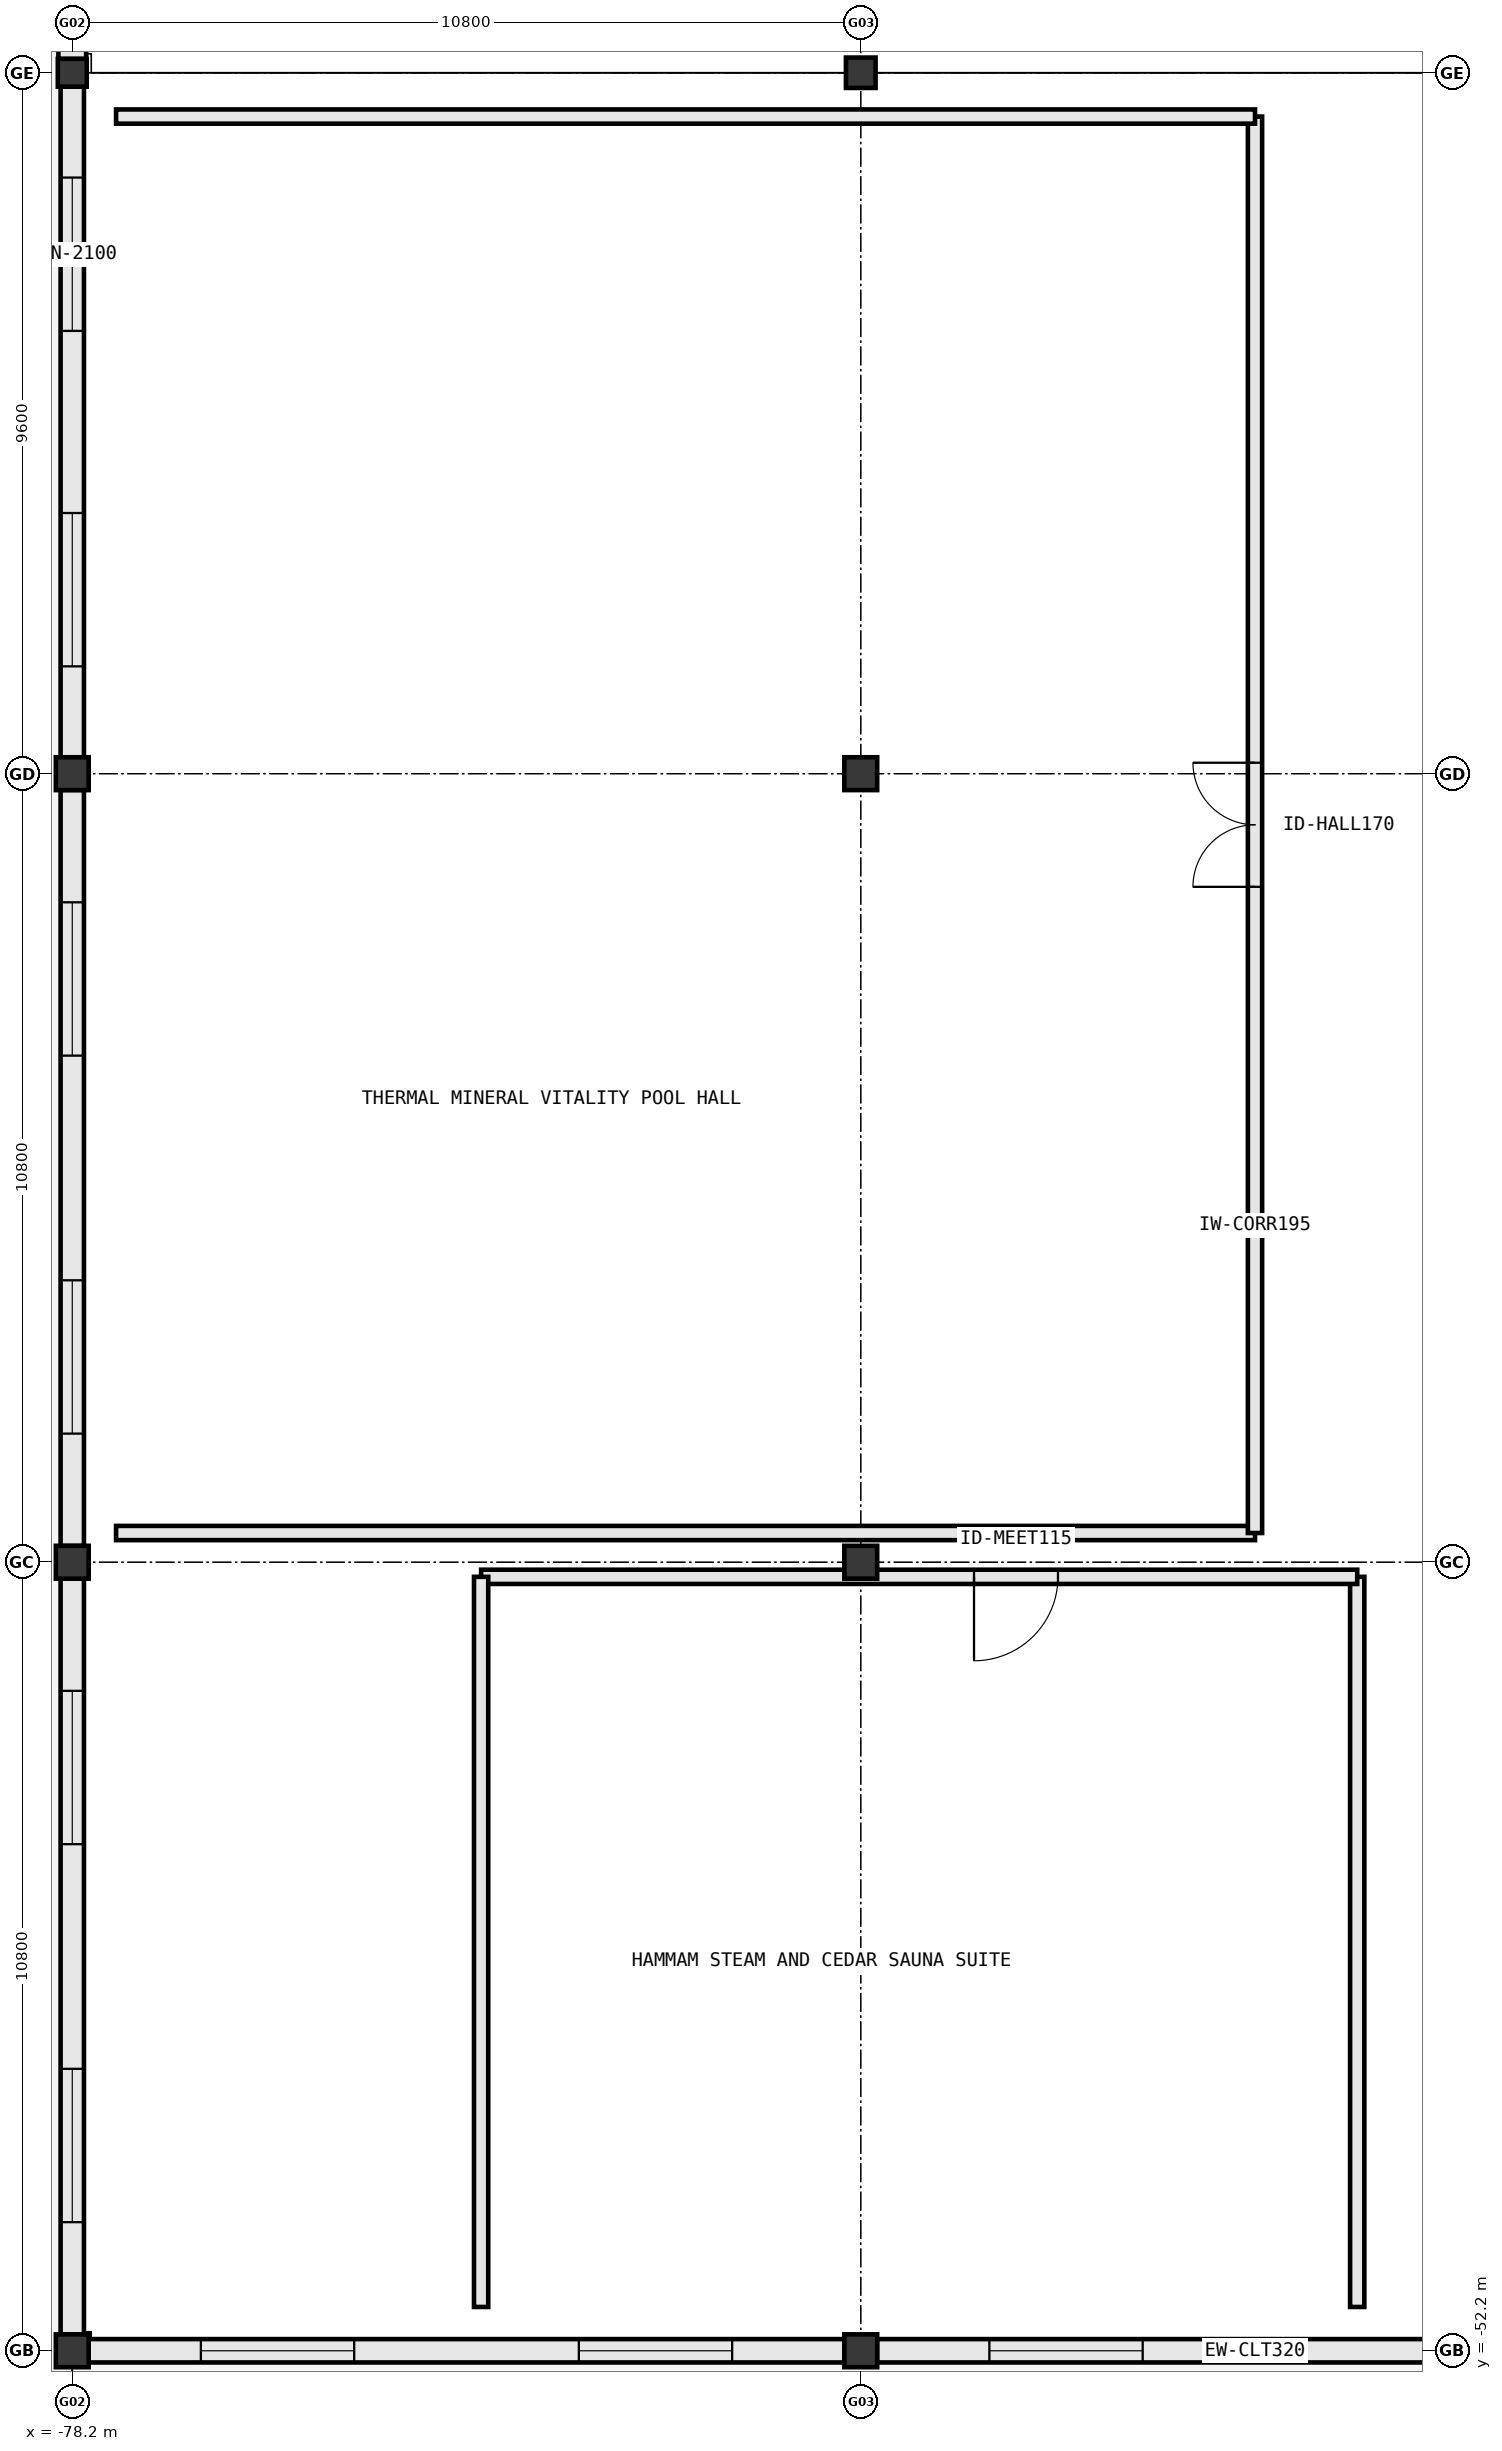
"""IFC4 building model, lengths in metres.
Left out: names, types, materials, properties, quantities, classifications, styles, units other than length and angle.
Written with IfcOpenShell. Run it as: python <this file> out.ifc"""

import sys

from ifc_helpers import new_model, si_unit, direction, frame, frame_2d, origin, origin_2d, place, context, subcontext, project, spatial, rectangle, i_section, extrude, element, fill, save


model = new_model("IFC4")
c1 = context("Model", 3, precision=1e-05, world=origin(), true_north=direction((0.0, 1.0)))
c2 = subcontext(c1, "Body", "Model", "MODEL_VIEW")
j1 = project(units=[si_unit("LENGTHUNIT", "METRE"), si_unit("PLANEANGLEUNIT", "RADIAN")], contexts=[c1])
p1 = place(None, origin())
s1 = spatial("IfcSite", under=j1, at=p1, CompositionType="ELEMENT")
p2 = place(p1, origin())
s2 = spatial("IfcBuilding", under=s1, at=p2, CompositionType="ELEMENT")
p3 = place(p2, origin())
s3 = spatial("IfcBuildingStorey", under=s2, at=p3, CompositionType="ELEMENT", Elevation=0.0)
p4 = place(p3, frame((-78.2, -21.0, 0.0), z_axis=(0.0, 0.0, 1.0), x_axis=(1.0, 0.0, 0.0)))
e1 = element("IfcColumn", 1, at=p4, inside=s3, PredefinedType="COLUMN", context=c2, shape_type="SweptSolid", body=[
    extrude(i_section(OverallWidth=0.396, OverallDepth=0.381, WebThickness=0.019, FlangeThickness=0.03, at=origin_2d()), origin(), (0.0, 0.0, 1.0), 5.4),
])
p5 = place(p3, frame((-67.4, -21.0, 0.0), z_axis=(0.0, 0.0, 1.0), x_axis=(1.0, 0.0, 0.0)))
e2 = element("IfcColumn", 2, at=p5, inside=s3, PredefinedType="COLUMN", context=c2, shape_type="SweptSolid", body=[
    extrude(i_section(OverallWidth=0.406, OverallDepth=0.416, WebThickness=0.03, FlangeThickness=0.048, at=origin_2d()), origin(), (0.0, 0.0, 1.0), 5.4),
])
for number, where, z_axis, x_axis in (
    (3, (-78.2, -52.2, 0.0), (0.0, 0.0, 1.0), (1.0, 0.0, 0.0)),
    (4, (-78.2, -41.4, 0.0), (0.0, 0.0, 1.0), (1.0, 0.0, 0.0)),
    (5, (-78.2, -30.6, 0.0), (0.0, 0.0, 1.0), (1.0, 0.0, 0.0)),
    (6, (-67.4, -52.2, 0.0), (0.0, 0.0, 1.0), (1.0, 0.0, 0.0)),
    (7, (-67.4, -41.4, 0.0), (0.0, 0.0, 1.0), (1.0, 0.0, 0.0)),
    (8, (-67.4, -30.6, 0.0), (0.0, 0.0, 1.0), (1.0, 0.0, 0.0)),
):
    element("IfcColumn", number, at=place(p3, frame(where, z_axis=z_axis, x_axis=x_axis)), inside=s3, PredefinedType="COLUMN", context=c2, shape_type="SweptSolid", body=[
        extrude(rectangle(XDim=0.45, YDim=0.45, at=origin_2d()), origin(), (0.0, 0.0, 1.0), 5.4),
    ])
p6 = place(p3, frame((-78.2, -11.588, 0.0), z_axis=(0.0, 0.0, 1.0), x_axis=(0.0, -1.0, 0.0)))
e9 = element("IfcWall", 9, at=p6, inside=s3, PredefinedType="STANDARD", context=c2, shape_type="SweptSolid", body=[
    extrude(rectangle(XDim=9.223, YDim=0.38, at=frame_2d((4.612, 0.0))), origin(), (0.0, 0.0, 1.0), 4.419),
])
p7 = place(p6, frame((3.412, 0.0, 0.0)))
e10 = element("IfcOpeningElement", 10, at=p7, cuts=e9, PredefinedType="OPENING", context=c2, shape_type="SweptSolid", body=[
    extrude(rectangle(XDim=2.2, YDim=2.4, at=frame_2d((1.1, 1.2))), frame((0.0, 0.202, 0.0), z_axis=(0.0, -1.0, 0.0), x_axis=(1.0, 0.0, 0.0)), (0.0, 0.0, 1.0), 0.404),
])
p8 = place(p3, frame((-78.2, -21.188, 0.0), z_axis=(0.0, 0.0, 1.0), x_axis=(0.0, -1.0, 0.0)))
e11 = element("IfcWall", 11, at=p8, inside=s3, PredefinedType="STANDARD", context=c2, shape_type="SweptSolid", body=[
    extrude(rectangle(XDim=9.188, YDim=0.32, at=frame_2d((4.594, 0.0))), origin(), (0.0, 0.0, 1.0), 4.419),
])
p9 = place(p8, frame((1.247, 0.0, 0.85)))
e12 = element("IfcOpeningElement", 12, at=p9, cuts=e11, PredefinedType="OPENING", context=c2, shape_type="SweptSolid", body=[
    extrude(rectangle(XDim=2.1, YDim=1.95, at=frame_2d((1.05, 0.975))), frame((0.0, 0.172, 0.0), z_axis=(0.0, -1.0, 0.0), x_axis=(1.0, 0.0, 0.0)), (0.0, 0.0, 1.0), 0.344),
])
p10 = place(p8, frame((5.841, 0.0, 0.85)))
e13 = element("IfcOpeningElement", 13, at=p10, cuts=e11, PredefinedType="OPENING", context=c2, shape_type="SweptSolid", body=[
    extrude(rectangle(XDim=2.1, YDim=1.95, at=frame_2d((1.05, 0.975))), frame((0.0, 0.172, 0.0), z_axis=(0.0, -1.0, 0.0), x_axis=(1.0, 0.0, 0.0)), (0.0, 0.0, 1.0), 0.344),
])
p11 = place(p3, frame((-78.2, -30.823, 0.0), z_axis=(0.0, 0.0, 1.0), x_axis=(0.0, -1.0, 0.0)))
e14 = element("IfcWall", 14, at=p11, inside=s3, PredefinedType="STANDARD", context=c2, shape_type="SweptSolid", body=[
    extrude(rectangle(XDim=10.354, YDim=0.32, at=frame_2d((5.177, 0.0))), origin(), (0.0, 0.0, 1.0), 4.419),
])
p12 = place(p11, frame((1.539, 0.0, 0.85)))
e15 = element("IfcOpeningElement", 15, at=p12, cuts=e14, PredefinedType="OPENING", context=c2, shape_type="SweptSolid", body=[
    extrude(rectangle(XDim=2.1, YDim=1.95, at=frame_2d((1.05, 0.975))), frame((0.0, 0.172, 0.0), z_axis=(0.0, -1.0, 0.0), x_axis=(1.0, 0.0, 0.0)), (0.0, 0.0, 1.0), 0.344),
])
p13 = place(p11, frame((6.716, 0.0, 0.85)))
e16 = element("IfcOpeningElement", 16, at=p13, cuts=e14, PredefinedType="OPENING", context=c2, shape_type="SweptSolid", body=[
    extrude(rectangle(XDim=2.1, YDim=1.95, at=frame_2d((1.05, 0.975))), frame((0.0, 0.172, 0.0), z_axis=(0.0, -1.0, 0.0), x_axis=(1.0, 0.0, 0.0)), (0.0, 0.0, 1.0), 0.344),
])
p14 = place(p3, frame((-78.2, -41.623, 0.0), z_axis=(0.0, 0.0, 1.0), x_axis=(0.0, -1.0, 0.0)))
e17 = element("IfcWall", 17, at=p14, inside=s3, PredefinedType="STANDARD", context=c2, shape_type="SweptSolid", body=[
    extrude(rectangle(XDim=10.354, YDim=0.32, at=frame_2d((5.177, 0.0))), origin(), (0.0, 0.0, 1.0), 4.419),
])
p15 = place(p14, frame((1.539, 0.0, 0.85)))
e18 = element("IfcOpeningElement", 18, at=p15, cuts=e17, PredefinedType="OPENING", context=c2, shape_type="SweptSolid", body=[
    extrude(rectangle(XDim=2.1, YDim=1.95, at=frame_2d((1.05, 0.975))), frame((0.0, 0.172, 0.0), z_axis=(0.0, -1.0, 0.0), x_axis=(1.0, 0.0, 0.0)), (0.0, 0.0, 1.0), 0.344),
])
p16 = place(p14, frame((6.716, 0.0, 0.85)))
e19 = element("IfcOpeningElement", 19, at=p16, cuts=e17, PredefinedType="OPENING", context=c2, shape_type="SweptSolid", body=[
    extrude(rectangle(XDim=2.1, YDim=1.95, at=frame_2d((1.05, 0.975))), frame((0.0, 0.172, 0.0), z_axis=(0.0, -1.0, 0.0), x_axis=(1.0, 0.0, 0.0)), (0.0, 0.0, 1.0), 0.344),
])
p17 = place(p3, frame((-77.977, -52.2, 0.0), z_axis=(0.0, 0.0, 1.0), x_axis=(1.0, 0.0, 0.0)))
e20 = element("IfcWall", 20, at=p17, inside=s3, PredefinedType="STANDARD", context=c2, shape_type="SweptSolid", body=[
    extrude(rectangle(XDim=10.354, YDim=0.32, at=frame_2d((5.177, 0.0))), origin(), (0.0, 0.0, 1.0), 4.336),
])
p18 = place(p17, frame((1.539, 0.0, 0.85)))
e21 = element("IfcOpeningElement", 21, at=p18, cuts=e20, PredefinedType="OPENING", context=c2, shape_type="SweptSolid", body=[
    extrude(rectangle(XDim=2.1, YDim=1.95, at=frame_2d((1.05, 0.975))), frame((0.0, 0.172, 0.0), z_axis=(0.0, -1.0, 0.0), x_axis=(1.0, 0.0, 0.0)), (0.0, 0.0, 1.0), 0.344),
])
p19 = place(p17, frame((6.716, 0.0, 0.85)))
e22 = element("IfcOpeningElement", 22, at=p19, cuts=e20, PredefinedType="OPENING", context=c2, shape_type="SweptSolid", body=[
    extrude(rectangle(XDim=2.1, YDim=1.95, at=frame_2d((1.05, 0.975))), frame((0.0, 0.172, 0.0), z_axis=(0.0, -1.0, 0.0), x_axis=(1.0, 0.0, 0.0)), (0.0, 0.0, 1.0), 0.344),
])
p20 = place(p3, frame((-67.177, -52.2, 0.0), z_axis=(0.0, 0.0, 1.0), x_axis=(1.0, 0.0, 0.0)))
e23 = element("IfcWall", 23, at=p20, inside=s3, PredefinedType="STANDARD", context=c2, shape_type="SweptSolid", body=[
    extrude(rectangle(XDim=10.354, YDim=0.32, at=frame_2d((5.177, 0.0))), origin(), (0.0, 0.0, 1.0), 4.336),
])
p21 = place(p20, frame((1.539, 0.0, 0.85)))
e24 = element("IfcOpeningElement", 24, at=p21, cuts=e23, PredefinedType="OPENING", context=c2, shape_type="SweptSolid", body=[
    extrude(rectangle(XDim=2.1, YDim=1.95, at=frame_2d((1.05, 0.975))), frame((0.0, 0.172, 0.0), z_axis=(0.0, -1.0, 0.0), x_axis=(1.0, 0.0, 0.0)), (0.0, 0.0, 1.0), 0.344),
])
p22 = place(p3, frame((-77.6, -41.0, 0.0), z_axis=(0.0, 0.0, 1.0), x_axis=(1.0, 0.0, 0.0)))
e25 = element("IfcWall", 25, at=p22, inside=s3, PredefinedType="PARTITIONING", context=c2, shape_type="SweptSolid", body=[
    extrude(rectangle(XDim=15.6, YDim=0.195, at=frame_2d((7.8, 0.0))), origin(), (0.0, 0.0, 1.0), 4.336),
])
p23 = place(p3, frame((-62.0, -41.0, 0.0), z_axis=(0.0, 0.0, 1.0), x_axis=(0.0, 1.0, 0.0)))
e26 = element("IfcWall", 26, at=p23, inside=s3, PredefinedType="PARTITIONING", context=c2, shape_type="SweptSolid", body=[
    extrude(rectangle(XDim=19.4, YDim=0.195, at=frame_2d((9.7, 0.0))), origin(), (0.0, 0.0, 1.0), 5.12),
])
p24 = place(p23, frame((8.85, 0.0, 0.0)))
e27 = element("IfcOpeningElement", 27, at=p24, cuts=e26, PredefinedType="OPENING", context=c2, shape_type="SweptSolid", body=[
    extrude(rectangle(XDim=1.7, YDim=2.3, at=frame_2d((0.85, 1.15))), frame((0.0, 0.11, 0.0), z_axis=(0.0, -1.0, 0.0), x_axis=(1.0, 0.0, 0.0)), (0.0, 0.0, 1.0), 0.219),
])
p25 = place(p3, frame((-62.0, -21.6, 0.0), z_axis=(0.0, 0.0, 1.0), x_axis=(-1.0, 0.0, 0.0)))
e28 = element("IfcWall", 28, at=p25, inside=s3, PredefinedType="PARTITIONING", context=c2, shape_type="SweptSolid", body=[
    extrude(rectangle(XDim=15.6, YDim=0.195, at=frame_2d((7.8, 0.0))), origin(), (0.0, 0.0, 1.0), 5.12),
])
p26 = place(p3, frame((-60.6, -51.6, 0.0), z_axis=(0.0, 0.0, 1.0), x_axis=(0.0, 1.0, 0.0)))
e29 = element("IfcWall", 29, at=p26, inside=s3, PredefinedType="PARTITIONING", context=c2, shape_type="SweptSolid", body=[
    extrude(rectangle(XDim=10.0, YDim=0.195, at=frame_2d((5.0, 0.0))), origin(), (0.0, 0.0, 1.0), 5.12),
])
p27 = place(p3, frame((-60.6, -41.6, 0.0), z_axis=(0.0, 0.0, 1.0), x_axis=(-1.0, 0.0, 0.0)))
e30 = element("IfcWall", 30, at=p27, inside=s3, PredefinedType="PARTITIONING", context=c2, shape_type="SweptSolid", body=[
    extrude(rectangle(XDim=12.0, YDim=0.195, at=frame_2d((6.0, 0.0))), origin(), (0.0, 0.0, 1.0), 4.336),
])
p28 = place(p27, frame((4.099, 0.0, 0.0)))
e31 = element("IfcOpeningElement", 31, at=p28, cuts=e30, PredefinedType="OPENING", context=c2, shape_type="SweptSolid", body=[
    extrude(rectangle(XDim=1.15, YDim=2.2, at=frame_2d((0.575, 1.1))), frame((0.0, 0.11, 0.0), z_axis=(0.0, -1.0, 0.0), x_axis=(1.0, 0.0, 0.0)), (0.0, 0.0, 1.0), 0.219),
])
p29 = place(p3, frame((-72.6, -41.6, 0.0), z_axis=(0.0, 0.0, 1.0), x_axis=(0.0, -1.0, 0.0)))
e32 = element("IfcWall", 32, at=p29, inside=s3, PredefinedType="PARTITIONING", context=c2, shape_type="SweptSolid", body=[
    extrude(rectangle(XDim=10.0, YDim=0.195, at=frame_2d((5.0, 0.0))), origin(), (0.0, 0.0, 1.0), 5.12),
])
p30 = place(p9, origin())
e33 = element("IfcWindow", 33, at=p30, inside=s3, PartitioningType="DOUBLE_PANEL_VERTICAL", PredefinedType="WINDOW", context=c2, shape_type="SweptSolid", body=[
    extrude(rectangle(XDim=2.1, YDim=1.95, at=frame_2d((1.05, 0.975))), frame((0.0, 0.03, 0.0), z_axis=(0.0, -1.0, 0.0), x_axis=(1.0, 0.0, 0.0)), (0.0, 0.0, 1.0), 0.06),
])
fill(e12, e33)
p31 = place(p10, origin())
e34 = element("IfcWindow", 34, at=p31, inside=s3, PartitioningType="DOUBLE_PANEL_VERTICAL", PredefinedType="WINDOW", context=c2, shape_type="SweptSolid", body=[
    extrude(rectangle(XDim=2.1, YDim=1.95, at=frame_2d((1.05, 0.975))), frame((0.0, 0.03, 0.0), z_axis=(0.0, -1.0, 0.0), x_axis=(1.0, 0.0, 0.0)), (0.0, 0.0, 1.0), 0.06),
])
fill(e13, e34)
p32 = place(p12, origin())
e35 = element("IfcWindow", 35, at=p32, inside=s3, PartitioningType="DOUBLE_PANEL_VERTICAL", PredefinedType="WINDOW", context=c2, shape_type="SweptSolid", body=[
    extrude(rectangle(XDim=2.1, YDim=1.95, at=frame_2d((1.05, 0.975))), frame((0.0, 0.03, 0.0), z_axis=(0.0, -1.0, 0.0), x_axis=(1.0, 0.0, 0.0)), (0.0, 0.0, 1.0), 0.06),
])
fill(e15, e35)
p33 = place(p13, origin())
e36 = element("IfcWindow", 36, at=p33, inside=s3, PartitioningType="DOUBLE_PANEL_VERTICAL", PredefinedType="WINDOW", context=c2, shape_type="SweptSolid", body=[
    extrude(rectangle(XDim=2.1, YDim=1.95, at=frame_2d((1.05, 0.975))), frame((0.0, 0.03, 0.0), z_axis=(0.0, -1.0, 0.0), x_axis=(1.0, 0.0, 0.0)), (0.0, 0.0, 1.0), 0.06),
])
fill(e16, e36)
p34 = place(p15, origin())
e37 = element("IfcWindow", 37, at=p34, inside=s3, PartitioningType="DOUBLE_PANEL_VERTICAL", PredefinedType="WINDOW", context=c2, shape_type="SweptSolid", body=[
    extrude(rectangle(XDim=2.1, YDim=1.95, at=frame_2d((1.05, 0.975))), frame((0.0, 0.03, 0.0), z_axis=(0.0, -1.0, 0.0), x_axis=(1.0, 0.0, 0.0)), (0.0, 0.0, 1.0), 0.06),
])
fill(e18, e37)
p35 = place(p16, origin())
e38 = element("IfcWindow", 38, at=p35, inside=s3, PartitioningType="DOUBLE_PANEL_VERTICAL", PredefinedType="WINDOW", context=c2, shape_type="SweptSolid", body=[
    extrude(rectangle(XDim=2.1, YDim=1.95, at=frame_2d((1.05, 0.975))), frame((0.0, 0.03, 0.0), z_axis=(0.0, -1.0, 0.0), x_axis=(1.0, 0.0, 0.0)), (0.0, 0.0, 1.0), 0.06),
])
fill(e19, e38)
p36 = place(p18, origin())
e39 = element("IfcWindow", 39, at=p36, inside=s3, PartitioningType="DOUBLE_PANEL_VERTICAL", PredefinedType="WINDOW", context=c2, shape_type="SweptSolid", body=[
    extrude(rectangle(XDim=2.1, YDim=1.95, at=frame_2d((1.05, 0.975))), frame((0.0, 0.03, 0.0), z_axis=(0.0, -1.0, 0.0), x_axis=(1.0, 0.0, 0.0)), (0.0, 0.0, 1.0), 0.06),
])
fill(e21, e39)
p37 = place(p19, origin())
e40 = element("IfcWindow", 40, at=p37, inside=s3, PartitioningType="DOUBLE_PANEL_VERTICAL", PredefinedType="WINDOW", context=c2, shape_type="SweptSolid", body=[
    extrude(rectangle(XDim=2.1, YDim=1.95, at=frame_2d((1.05, 0.975))), frame((0.0, 0.03, 0.0), z_axis=(0.0, -1.0, 0.0), x_axis=(1.0, 0.0, 0.0)), (0.0, 0.0, 1.0), 0.06),
])
fill(e22, e40)
p38 = place(p21, origin())
e41 = element("IfcWindow", 41, at=p38, inside=s3, PartitioningType="DOUBLE_PANEL_VERTICAL", PredefinedType="WINDOW", context=c2, shape_type="SweptSolid", body=[
    extrude(rectangle(XDim=2.1, YDim=1.95, at=frame_2d((1.05, 0.975))), frame((0.0, 0.03, 0.0), z_axis=(0.0, -1.0, 0.0), x_axis=(1.0, 0.0, 0.0)), (0.0, 0.0, 1.0), 0.06),
])
fill(e24, e41)
p39 = place(p24, origin())
e42 = element("IfcDoor", 42, at=p39, inside=s3, OperationType="DOUBLE_DOOR_SINGLE_SWING", PredefinedType="DOOR", context=c2, shape_type="SweptSolid", body=[
    extrude(rectangle(XDim=1.7, YDim=2.3, at=frame_2d((0.85, 1.15))), frame((0.0, 0.025, 0.0), z_axis=(0.0, -1.0, 0.0), x_axis=(1.0, 0.0, 0.0)), (0.0, 0.0, 1.0), 0.05),
])
fill(e27, e42)
p40 = place(p28, origin())
e43 = element("IfcDoor", 43, at=p40, inside=s3, OperationType="SINGLE_SWING_RIGHT", PredefinedType="DOOR", context=c2, shape_type="SweptSolid", body=[
    extrude(rectangle(XDim=1.15, YDim=2.2, at=frame_2d((0.575, 1.1))), frame((0.0, 0.025, 0.0), z_axis=(0.0, -1.0, 0.0), x_axis=(1.0, 0.0, 0.0)), (0.0, 0.0, 1.0), 0.05),
])
fill(e31, e43)
save(model, sys.argv[1])
